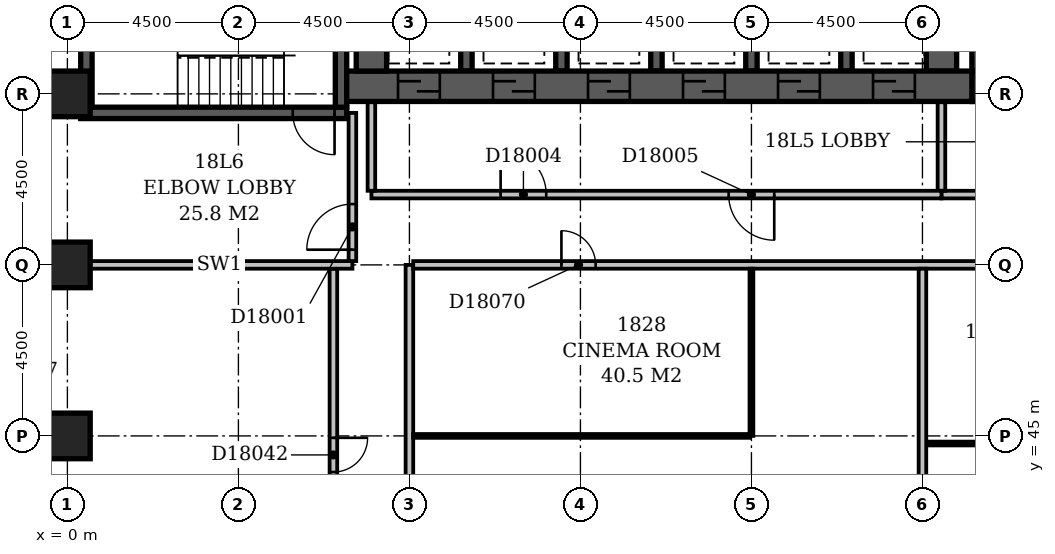
"""IFC4 building model, lengths in metres.
Left out: names, types, materials, properties, quantities, classifications, styles, units other than length and angle.
Written with IfcOpenShell. Run it as: python <this file> out.ifc"""

import sys

from ifc_helpers import new_model, si_unit, direction, frame, frame_2d, origin, origin_2d, place, context, subcontext, project, spatial, rectangle, extrude, element, fill, save


model = new_model("IFC4")
c1 = context("Model", 3, precision=1e-05, world=origin(), true_north=direction((0.0, 1.0)))
c2 = subcontext(c1, "Body", "Model", "MODEL_VIEW")
j1 = project(units=[si_unit("LENGTHUNIT", "METRE"), si_unit("PLANEANGLEUNIT", "RADIAN")], contexts=[c1])
p1 = place(None, origin())
s1 = spatial("IfcSite", under=j1, at=p1, CompositionType="ELEMENT")
p2 = place(p1, origin())
s2 = spatial("IfcBuilding", under=s1, at=p2, CompositionType="ELEMENT")
p3 = place(p2, frame((0.0, 0.0, 75.8)))
s3 = spatial("IfcBuildingStorey", under=s2, at=p3, CompositionType="ELEMENT", Elevation=75.8)
p4 = place(p3, frame((0.35, 53.5, -0.3), z_axis=(0.0, 0.0, 1.0), x_axis=(1.0, 0.0, 0.0)))
e1 = element("IfcWall", 1, at=p4, inside=s3, PredefinedType="SHEAR", context=c2, shape_type="SweptSolid", body=[
    extrude(rectangle(XDim=7.0, YDim=0.3, at=frame_2d((3.5, 0.0))), origin(), (0.0, 0.0, 1.0), 3.6),
])
p5 = place(p4, frame((5.58, 0.0, 0.3)))
e2 = element("IfcOpeningElement", 2, at=p5, cuts=e1, PredefinedType="OPENING", context=c2, shape_type="SweptSolid", body=[
    extrude(rectangle(XDim=1.1, YDim=2.1, at=frame_2d((0.55, 1.05))), frame((0.0, 0.162, 0.0), z_axis=(0.0, -1.0, 0.0), x_axis=(1.0, 0.0, 0.0)), (0.0, 0.0, 1.0), 0.324),
])
for number, where, z_axis, x_axis in (
    (3, (0.5, 53.65, -0.3), (0.0, 0.0, 1.0), (0.0, 1.0, 0.0)),
    (4, (7.2, 53.65, -0.3), (0.0, 0.0, 1.0), (0.0, 1.0, 0.0)),
):
    element("IfcWall", number, at=place(p3, frame(where, z_axis=z_axis, x_axis=x_axis)), inside=s3, PredefinedType="SHEAR", context=c2, shape_type="SweptSolid", body=[
        extrude(rectangle(XDim=4.2, YDim=0.3, at=frame_2d((2.1, 0.0))), origin(), (0.0, 0.0, 1.0), 3.6),
    ])
p6 = place(p3, frame((7.35, 54.2, -0.3), z_axis=(0.0, 0.0, 1.0), x_axis=(1.0, 0.0, 0.0)))
e5 = element("IfcWall", 5, at=p6, inside=s3, PredefinedType="SHEAR", context=c2, shape_type="SweptSolid", body=[
    extrude(rectangle(XDim=16.45, YDim=0.8, at=frame_2d((8.225, 0.0))), origin(), (0.0, 0.0, 1.0), 3.6),
])
p7 = place(p6, frame((1.35, 0.0, 0.3)))
e6 = element("IfcOpeningElement", 6, at=p7, cuts=e5, PredefinedType="OPENING", context=c2, shape_type="SweptSolid", body=[
    extrude(rectangle(XDim=1.1, YDim=2.1, at=frame_2d((0.55, 1.05))), frame((0.0, 0.412, 0.0), z_axis=(0.0, -1.0, 0.0), x_axis=(1.0, 0.0, 0.0)), (0.0, 0.0, 1.0), 0.824),
])
p8 = place(p6, frame((3.85, 0.0, 0.3)))
e7 = element("IfcOpeningElement", 7, at=p8, cuts=e5, PredefinedType="OPENING", context=c2, shape_type="SweptSolid", body=[
    extrude(rectangle(XDim=1.1, YDim=2.1, at=frame_2d((0.55, 1.05))), frame((0.0, 0.412, 0.0), z_axis=(0.0, -1.0, 0.0), x_axis=(1.0, 0.0, 0.0)), (0.0, 0.0, 1.0), 0.824),
])
p9 = place(p6, frame((6.35, 0.0, 0.3)))
e8 = element("IfcOpeningElement", 8, at=p9, cuts=e5, PredefinedType="OPENING", context=c2, shape_type="SweptSolid", body=[
    extrude(rectangle(XDim=1.1, YDim=2.1, at=frame_2d((0.55, 1.05))), frame((0.0, 0.412, 0.0), z_axis=(0.0, -1.0, 0.0), x_axis=(1.0, 0.0, 0.0)), (0.0, 0.0, 1.0), 0.824),
])
p10 = place(p6, frame((8.85, 0.0, 0.3)))
e9 = element("IfcOpeningElement", 9, at=p10, cuts=e5, PredefinedType="OPENING", context=c2, shape_type="SweptSolid", body=[
    extrude(rectangle(XDim=1.1, YDim=2.1, at=frame_2d((0.55, 1.05))), frame((0.0, 0.412, 0.0), z_axis=(0.0, -1.0, 0.0), x_axis=(1.0, 0.0, 0.0)), (0.0, 0.0, 1.0), 0.824),
])
p11 = place(p6, frame((11.35, 0.0, 0.3)))
e10 = element("IfcOpeningElement", 10, at=p11, cuts=e5, PredefinedType="OPENING", context=c2, shape_type="SweptSolid", body=[
    extrude(rectangle(XDim=1.1, YDim=2.1, at=frame_2d((0.55, 1.05))), frame((0.0, 0.412, 0.0), z_axis=(0.0, -1.0, 0.0), x_axis=(1.0, 0.0, 0.0)), (0.0, 0.0, 1.0), 0.824),
])
p12 = place(p6, frame((13.85, 0.0, 0.3)))
e11 = element("IfcOpeningElement", 11, at=p12, cuts=e5, PredefinedType="OPENING", context=c2, shape_type="SweptSolid", body=[
    extrude(rectangle(XDim=1.1, YDim=2.1, at=frame_2d((0.55, 1.05))), frame((0.0, 0.412, 0.0), z_axis=(0.0, -1.0, 0.0), x_axis=(1.0, 0.0, 0.0)), (0.0, 0.0, 1.0), 0.824),
])
p13 = place(p3, frame((8.0, 54.6, -0.3), z_axis=(0.0, 0.0, 1.0), x_axis=(0.0, 1.0, 0.0)))
e12 = element("IfcWall", 12, at=p13, inside=s3, PredefinedType="SHEAR", context=c2, shape_type="SweptSolid", body=[
    extrude(rectangle(XDim=3.0, YDim=0.8, at=frame_2d((1.5, 0.0))), origin(), (0.0, 0.0, 1.0), 3.6),
])
for number, where, z_axis, x_axis in (
    (13, (10.5, 54.6, -0.3), (0.0, 0.0, 1.0), (0.0, 1.0, 0.0)),
    (14, (13.0, 54.6, -0.3), (0.0, 0.0, 1.0), (0.0, 1.0, 0.0)),
    (15, (15.5, 54.6, -0.3), (0.0, 0.0, 1.0), (0.0, 1.0, 0.0)),
    (16, (18.0, 54.6, -0.3), (0.0, 0.0, 1.0), (0.0, 1.0, 0.0)),
    (17, (20.5, 54.6, -0.3), (0.0, 0.0, 1.0), (0.0, 1.0, 0.0)),
):
    element("IfcWall", number, at=place(p3, frame(where, z_axis=z_axis, x_axis=x_axis)), inside=s3, PredefinedType="SHEAR", context=c2, shape_type="SweptSolid", body=[
        extrude(rectangle(XDim=3.0, YDim=0.3, at=frame_2d((1.5, 0.0))), origin(), (0.0, 0.0, 1.0), 3.6),
    ])
p14 = place(p3, frame((23.0, 54.6, -0.3), z_axis=(0.0, 0.0, 1.0), x_axis=(0.0, 1.0, 0.0)))
e18 = element("IfcWall", 18, at=p14, inside=s3, PredefinedType="SHEAR", context=c2, shape_type="SweptSolid", body=[
    extrude(rectangle(XDim=3.0, YDim=0.8, at=frame_2d((1.5, 0.0))), origin(), (0.0, 0.0, 1.0), 3.6),
])
p15 = place(p3, frame((23.8, 54.2, -0.3), z_axis=(0.0, 0.0, 1.0), x_axis=(1.0, 0.0, 0.0)))
e19 = element("IfcWall", 19, at=p15, inside=s3, PredefinedType="SHEAR", context=c2, shape_type="SweptSolid", body=[
    extrude(rectangle(XDim=3.3, YDim=0.8, at=frame_2d((1.65, 0.0))), origin(), (0.0, 0.0, 1.0), 3.6),
])
p16 = place(p15, frame((1.1, 0.0, 0.3)))
e20 = element("IfcOpeningElement", 20, at=p16, cuts=e19, PredefinedType="OPENING", context=c2, shape_type="SweptSolid", body=[
    extrude(rectangle(XDim=1.1, YDim=2.1, at=frame_2d((0.55, 1.05))), frame((0.0, 0.412, 0.0), z_axis=(0.0, -1.0, 0.0), x_axis=(1.0, 0.0, 0.0)), (0.0, 0.0, 1.0), 0.824),
])
p17 = place(p3, frame((24.2, 54.6, -0.3), z_axis=(0.0, 0.0, 1.0), x_axis=(0.0, 1.0, 0.0)))
e21 = element("IfcWall", 21, at=p17, inside=s3, PredefinedType="SHEAR", context=c2, shape_type="SweptSolid", body=[
    extrude(rectangle(XDim=3.0, YDim=0.8, at=frame_2d((1.5, 0.0))), origin(), (0.0, 0.0, 1.0), 3.6),
])
for number, where, z_axis, x_axis in (
    (22, (0.0, 45.0, -0.3), (0.0, 0.0, 1.0), (1.0, 0.0, 0.0)),
    (23, (0.0, 49.5, -0.3), (0.0, 0.0, 1.0), (1.0, 0.0, 0.0)),
    (24, (0.0, 54.0, -0.3), (0.0, 0.0, 1.0), (1.0, 0.0, 0.0)),
):
    element("IfcColumn", number, at=place(p3, frame(where, z_axis=z_axis, x_axis=x_axis)), inside=s3, PredefinedType="COLUMN", context=c2, shape_type="SweptSolid", body=[
        extrude(rectangle(XDim=1.2, YDim=1.2, at=origin_2d()), origin(), (0.0, 0.0, 1.0), 3.6),
    ])
p18 = place(p3, frame((8.0, 51.35, 0.0), z_axis=(0.0, 0.0, 1.0), x_axis=(1.0, 0.0, 0.0)))
e25 = element("IfcWall", 25, at=p18, inside=s3, PredefinedType="PARTITIONING", context=c2, shape_type="SweptSolid", body=[
    extrude(rectangle(XDim=15.0, YDim=0.2, at=frame_2d((7.5, 0.0))), origin(), (0.0, 0.0, 1.0), 3.3),
])
p19 = place(p18, frame((3.4, 0.0, 0.0)))
e26 = element("IfcOpeningElement", 26, at=p19, cuts=e25, PredefinedType="OPENING", context=c2, shape_type="SweptSolid", body=[
    extrude(rectangle(XDim=1.2, YDim=2.1, at=frame_2d((0.6, 1.05))), frame((0.0, 0.112, 0.0), z_axis=(0.0, -1.0, 0.0), x_axis=(1.0, 0.0, 0.0)), (0.0, 0.0, 1.0), 0.224),
])
p20 = place(p18, frame((9.4, 0.0, 0.0)))
e27 = element("IfcOpeningElement", 27, at=p20, cuts=e25, PredefinedType="OPENING", context=c2, shape_type="SweptSolid", body=[
    extrude(rectangle(XDim=1.2, YDim=2.1, at=frame_2d((0.6, 1.05))), frame((0.0, 0.112, 0.0), z_axis=(0.0, -1.0, 0.0), x_axis=(1.0, 0.0, 0.0)), (0.0, 0.0, 1.0), 0.224),
])
for number, where, z_axis, x_axis in (
    (28, (23.0, 51.45, 0.0), (0.0, 0.0, 1.0), (0.0, 1.0, 0.0)),
    (29, (8.0, 51.45, 0.0), (0.0, 0.0, 1.0), (0.0, 1.0, 0.0)),
):
    element("IfcWall", number, at=place(p3, frame(where, z_axis=z_axis, x_axis=x_axis)), inside=s3, PredefinedType="PARTITIONING", context=c2, shape_type="SweptSolid", body=[
        extrude(rectangle(XDim=2.33, YDim=0.2, at=frame_2d((1.165, 0.0))), origin(), (0.0, 0.0, 1.0), 3.3),
    ])
p21 = place(p3, frame((23.0, 51.35, 0.0), z_axis=(0.0, 0.0, 1.0), x_axis=(1.0, 0.0, 0.0)))
e30 = element("IfcWall", 30, at=p21, inside=s3, PredefinedType="PARTITIONING", context=c2, shape_type="SweptSolid", body=[
    extrude(rectangle(XDim=4.8, YDim=0.2, at=frame_2d((2.4, 0.0))), origin(), (0.0, 0.0, 1.0), 3.3),
])
p22 = place(p21, frame((1.65, 0.0, 0.0)))
e31 = element("IfcOpeningElement", 31, at=p22, cuts=e30, PredefinedType="OPENING", context=c2, shape_type="SweptSolid", body=[
    extrude(rectangle(XDim=1.2, YDim=2.1, at=frame_2d((0.6, 1.05))), frame((0.0, 0.112, 0.0), z_axis=(0.0, -1.0, 0.0), x_axis=(1.0, 0.0, 0.0)), (0.0, 0.0, 1.0), 0.224),
])
p23 = place(p3, frame((0.5, 49.5, 0.0), z_axis=(0.0, 0.0, 1.0), x_axis=(1.0, 0.0, 0.0)))
e32 = element("IfcWall", 32, at=p23, inside=s3, PredefinedType="PARTITIONING", context=c2, shape_type="SweptSolid", body=[
    extrude(rectangle(XDim=7.0, YDim=0.2, at=frame_2d((3.5, 0.0))), origin(), (0.0, 0.0, 1.0), 3.3),
])
p24 = place(p3, frame((7.5, 49.6, 0.0), z_axis=(0.0, 0.0, 1.0), x_axis=(0.0, 1.0, 0.0)))
e33 = element("IfcWall", 33, at=p24, inside=s3, PredefinedType="PARTITIONING", context=c2, shape_type="SweptSolid", body=[
    extrude(rectangle(XDim=3.9, YDim=0.2, at=frame_2d((1.95, 0.0))), origin(), (0.0, 0.0, 1.0), 3.3),
])
p25 = place(p24, frame((0.3, 0.0, 0.0)))
e34 = element("IfcOpeningElement", 34, at=p25, cuts=e33, PredefinedType="OPENING", context=c2, shape_type="SweptSolid", body=[
    extrude(rectangle(XDim=1.2, YDim=2.1, at=frame_2d((0.6, 1.05))), frame((0.0, 0.112, 0.0), z_axis=(0.0, -1.0, 0.0), x_axis=(1.0, 0.0, 0.0)), (0.0, 0.0, 1.0), 0.224),
])
p26 = place(p3, frame((9.0, 5.0, 0.0), z_axis=(0.0, 0.0, 1.0), x_axis=(0.0, 1.0, 0.0)))
e35 = element("IfcWall", 35, at=p26, inside=s3, PredefinedType="PARTITIONING", context=c2, shape_type="SweptSolid", body=[
    extrude(rectangle(XDim=44.5, YDim=0.2, at=frame_2d((22.25, 0.0))), origin(), (0.0, 0.0, 1.0), 3.3),
])
p27 = place(p26, frame((17.8, 0.0, 0.0)))
e36 = element("IfcOpeningElement", 36, at=p27, cuts=e35, PredefinedType="OPENING", context=c2, shape_type="SweptSolid", body=[
    extrude(rectangle(XDim=1.0, YDim=2.1, at=frame_2d((0.5, 1.05))), frame((0.0, 0.112, 0.0), z_axis=(0.0, -1.0, 0.0), x_axis=(1.0, 0.0, 0.0)), (0.0, 0.0, 1.0), 0.224),
])
p28 = place(p26, frame((14.95, 0.0, 0.0)))
e37 = element("IfcOpeningElement", 37, at=p28, cuts=e35, PredefinedType="OPENING", context=c2, shape_type="SweptSolid", body=[
    extrude(rectangle(XDim=1.0, YDim=2.1, at=frame_2d((0.5, 1.05))), frame((0.0, 0.112, 0.0), z_axis=(0.0, -1.0, 0.0), x_axis=(1.0, 0.0, 0.0)), (0.0, 0.0, 1.0), 0.224),
])
p29 = place(p26, frame((10.45, 0.0, 0.0)))
e38 = element("IfcOpeningElement", 38, at=p29, cuts=e35, PredefinedType="OPENING", context=c2, shape_type="SweptSolid", body=[
    extrude(rectangle(XDim=1.0, YDim=2.1, at=frame_2d((0.5, 1.05))), frame((0.0, 0.112, 0.0), z_axis=(0.0, -1.0, 0.0), x_axis=(1.0, 0.0, 0.0)), (0.0, 0.0, 1.0), 0.224),
])
p30 = place(p26, frame((5.95, 0.0, 0.0)))
e39 = element("IfcOpeningElement", 39, at=p30, cuts=e35, PredefinedType="OPENING", context=c2, shape_type="SweptSolid", body=[
    extrude(rectangle(XDim=1.0, YDim=2.1, at=frame_2d((0.5, 1.05))), frame((0.0, 0.112, 0.0), z_axis=(0.0, -1.0, 0.0), x_axis=(1.0, 0.0, 0.0)), (0.0, 0.0, 1.0), 0.224),
])
p31 = place(p26, frame((35.0, 0.0, 0.0)))
e40 = element("IfcOpeningElement", 40, at=p31, cuts=e35, PredefinedType="OPENING", context=c2, shape_type="SweptSolid", body=[
    extrude(rectangle(XDim=0.9, YDim=2.1, at=frame_2d((0.45, 1.05))), frame((0.0, 0.112, 0.0), z_axis=(0.0, -1.0, 0.0), x_axis=(1.0, 0.0, 0.0)), (0.0, 0.0, 1.0), 0.224),
])
p32 = place(p26, frame((1.5, 0.0, 0.0)))
e41 = element("IfcOpeningElement", 41, at=p32, cuts=e35, PredefinedType="OPENING", context=c2, shape_type="SweptSolid", body=[
    extrude(rectangle(XDim=0.9, YDim=2.1, at=frame_2d((0.45, 1.05))), frame((0.0, 0.112, 0.0), z_axis=(0.0, -1.0, 0.0), x_axis=(1.0, 0.0, 0.0)), (0.0, 0.0, 1.0), 0.224),
])
p33 = place(p3, frame((7.0, 34.6, 0.0), z_axis=(0.0, 0.0, 1.0), x_axis=(0.0, 1.0, 0.0)))
e42 = element("IfcWall", 42, at=p33, inside=s3, PredefinedType="PARTITIONING", context=c2, shape_type="SweptSolid", body=[
    extrude(rectangle(XDim=14.8, YDim=0.2, at=frame_2d((7.4, 0.0))), origin(), (0.0, 0.0, 1.0), 3.3),
])
p34 = place(p33, frame((1.9, 0.0, 0.0)))
e43 = element("IfcOpeningElement", 43, at=p34, cuts=e42, PredefinedType="OPENING", context=c2, shape_type="SweptSolid", body=[
    extrude(rectangle(XDim=1.0, YDim=2.1, at=frame_2d((0.5, 1.05))), frame((0.0, 0.112, 0.0), z_axis=(0.0, -1.0, 0.0), x_axis=(1.0, 0.0, 0.0)), (0.0, 0.0, 1.0), 0.224),
])
p35 = place(p33, frame((9.45, 0.0, 0.0)))
e44 = element("IfcOpeningElement", 44, at=p35, cuts=e42, PredefinedType="OPENING", context=c2, shape_type="SweptSolid", body=[
    extrude(rectangle(XDim=0.9, YDim=2.1, at=frame_2d((0.45, 1.05))), frame((0.0, 0.112, 0.0), z_axis=(0.0, -1.0, 0.0), x_axis=(1.0, 0.0, 0.0)), (0.0, 0.0, 1.0), 0.224),
])
p36 = place(p3, frame((22.5, 36.6, 0.0), z_axis=(0.0, 0.0, 1.0), x_axis=(0.0, 1.0, 0.0)))
e45 = element("IfcWall", 45, at=p36, inside=s3, PredefinedType="PARTITIONING", context=c2, shape_type="SweptSolid", body=[
    extrude(rectangle(XDim=12.8, YDim=0.2, at=frame_2d((6.4, 0.0))), origin(), (0.0, 0.0, 1.0), 3.3),
])
p37 = place(p3, frame((22.6, 44.8, 0.0), z_axis=(0.0, 0.0, 1.0), x_axis=(1.0, 0.0, 0.0)))
e46 = element("IfcWall", 46, at=p37, inside=s3, PredefinedType="PARTITIONING", context=c2, shape_type="SweptSolid", body=[
    extrude(rectangle(XDim=4.85, YDim=0.1, at=frame_2d((2.425, 0.0))), origin(), (0.0, 0.0, 1.0), 3.3),
])
p38 = place(p37, frame((1.95, 0.0, 0.0)))
e47 = element("IfcOpeningElement", 47, at=p38, cuts=e46, PredefinedType="OPENING", context=c2, shape_type="SweptSolid", body=[
    extrude(rectangle(XDim=0.9, YDim=2.1, at=frame_2d((0.45, 1.05))), frame((0.0, 0.062, 0.0), z_axis=(0.0, -1.0, 0.0), x_axis=(1.0, 0.0, 0.0)), (0.0, 0.0, 1.0), 0.124),
])
p39 = place(p3, frame((9.1, 45.0, 0.0), z_axis=(0.0, 0.0, 1.0), x_axis=(1.0, 0.0, 0.0)))
e48 = element("IfcWall", 48, at=p39, inside=s3, PredefinedType="PARTITIONING", context=c2, shape_type="SweptSolid", body=[
    extrude(rectangle(XDim=8.85, YDim=0.1, at=frame_2d((4.425, 0.0))), origin(), (0.0, 0.0, 1.0), 3.3),
])
p40 = place(p3, frame((18.0, 45.0, 0.0), z_axis=(0.0, 0.0, 1.0), x_axis=(0.0, 1.0, 0.0)))
e49 = element("IfcWall", 49, at=p40, inside=s3, PredefinedType="PARTITIONING", context=c2, shape_type="SweptSolid", body=[
    extrude(rectangle(XDim=4.4, YDim=0.1, at=frame_2d((2.2, 0.0))), origin(), (0.0, 0.0, 1.0), 3.3),
])
p41 = place(p3, frame((9.1, 49.5, 0.0), z_axis=(0.0, 0.0, 1.0), x_axis=(1.0, 0.0, 0.0)))
e50 = element("IfcWall", 50, at=p41, inside=s3, PredefinedType="PARTITIONING", context=c2, shape_type="SweptSolid", body=[
    extrude(rectangle(XDim=57.8, YDim=0.2, at=frame_2d((28.9, 0.0))), origin(), (0.0, 0.0, 1.0), 3.3),
])
p42 = place(p41, frame((18.7, 0.0, 0.0)))
e51 = element("IfcOpeningElement", 51, at=p42, cuts=e50, PredefinedType="OPENING", context=c2, shape_type="SweptSolid", body=[
    extrude(rectangle(XDim=1.0, YDim=2.1, at=frame_2d((0.5, 1.05))), frame((0.0, 0.112, 0.0), z_axis=(0.0, -1.0, 0.0), x_axis=(1.0, 0.0, 0.0)), (0.0, 0.0, 1.0), 0.224),
])
p43 = place(p41, frame((24.35, 0.0, 0.0)))
e52 = element("IfcOpeningElement", 52, at=p43, cuts=e50, PredefinedType="OPENING", context=c2, shape_type="SweptSolid", body=[
    extrude(rectangle(XDim=1.0, YDim=2.1, at=frame_2d((0.5, 1.05))), frame((0.0, 0.112, 0.0), z_axis=(0.0, -1.0, 0.0), x_axis=(1.0, 0.0, 0.0)), (0.0, 0.0, 1.0), 0.224),
])
p44 = place(p41, frame((27.2, 0.0, 0.0)))
e53 = element("IfcOpeningElement", 53, at=p44, cuts=e50, PredefinedType="OPENING", context=c2, shape_type="SweptSolid", body=[
    extrude(rectangle(XDim=1.0, YDim=2.1, at=frame_2d((0.5, 1.05))), frame((0.0, 0.112, 0.0), z_axis=(0.0, -1.0, 0.0), x_axis=(1.0, 0.0, 0.0)), (0.0, 0.0, 1.0), 0.224),
])
p45 = place(p41, frame((43.1, 0.0, 0.0)))
e54 = element("IfcOpeningElement", 54, at=p45, cuts=e50, PredefinedType="OPENING", context=c2, shape_type="SweptSolid", body=[
    extrude(rectangle(XDim=1.0, YDim=2.1, at=frame_2d((0.5, 1.05))), frame((0.0, 0.112, 0.0), z_axis=(0.0, -1.0, 0.0), x_axis=(1.0, 0.0, 0.0)), (0.0, 0.0, 1.0), 0.224),
])
p46 = place(p41, frame((3.9, 0.0, 0.0)))
e55 = element("IfcOpeningElement", 55, at=p46, cuts=e50, PredefinedType="OPENING", context=c2, shape_type="SweptSolid", body=[
    extrude(rectangle(XDim=0.9, YDim=2.1, at=frame_2d((0.45, 1.05))), frame((0.0, 0.112, 0.0), z_axis=(0.0, -1.0, 0.0), x_axis=(1.0, 0.0, 0.0)), (0.0, 0.0, 1.0), 0.224),
])
p47 = place(p25, origin())
e56 = element("IfcDoor", 56, at=p47, inside=s3, OperationType="SINGLE_SWING_LEFT", PredefinedType="DOOR", context=c2, shape_type="SweptSolid", body=[
    extrude(rectangle(XDim=1.2, YDim=2.1, at=frame_2d((0.6, 1.05))), frame((0.0, 0.025, 0.0), z_axis=(0.0, -1.0, 0.0), x_axis=(1.0, 0.0, 0.0)), (0.0, 0.0, 1.0), 0.05),
])
fill(e34, e56)
p48 = place(p7, origin())
e57 = element("IfcDoor", 57, at=p48, inside=s3, OperationType="SLIDING_TO_LEFT", PredefinedType="DOOR", context=c2, shape_type="SweptSolid", body=[
    extrude(rectangle(XDim=1.1, YDim=2.1, at=frame_2d((0.55, 1.05))), frame((0.0, 0.025, 0.0), z_axis=(0.0, -1.0, 0.0), x_axis=(1.0, 0.0, 0.0)), (0.0, 0.0, 1.0), 0.05),
])
fill(e6, e57)
p49 = place(p8, origin())
e58 = element("IfcDoor", 58, at=p49, inside=s3, OperationType="SLIDING_TO_LEFT", PredefinedType="DOOR", context=c2, shape_type="SweptSolid", body=[
    extrude(rectangle(XDim=1.1, YDim=2.1, at=frame_2d((0.55, 1.05))), frame((0.0, 0.025, 0.0), z_axis=(0.0, -1.0, 0.0), x_axis=(1.0, 0.0, 0.0)), (0.0, 0.0, 1.0), 0.05),
])
fill(e7, e58)
p50 = place(p9, origin())
e59 = element("IfcDoor", 59, at=p50, inside=s3, OperationType="SLIDING_TO_LEFT", PredefinedType="DOOR", context=c2, shape_type="SweptSolid", body=[
    extrude(rectangle(XDim=1.1, YDim=2.1, at=frame_2d((0.55, 1.05))), frame((0.0, 0.025, 0.0), z_axis=(0.0, -1.0, 0.0), x_axis=(1.0, 0.0, 0.0)), (0.0, 0.0, 1.0), 0.05),
])
fill(e8, e59)
p51 = place(p10, origin())
e60 = element("IfcDoor", 60, at=p51, inside=s3, OperationType="SLIDING_TO_LEFT", PredefinedType="DOOR", context=c2, shape_type="SweptSolid", body=[
    extrude(rectangle(XDim=1.1, YDim=2.1, at=frame_2d((0.55, 1.05))), frame((0.0, 0.025, 0.0), z_axis=(0.0, -1.0, 0.0), x_axis=(1.0, 0.0, 0.0)), (0.0, 0.0, 1.0), 0.05),
])
fill(e9, e60)
p52 = place(p11, origin())
e61 = element("IfcDoor", 61, at=p52, inside=s3, OperationType="SLIDING_TO_LEFT", PredefinedType="DOOR", context=c2, shape_type="SweptSolid", body=[
    extrude(rectangle(XDim=1.1, YDim=2.1, at=frame_2d((0.55, 1.05))), frame((0.0, 0.025, 0.0), z_axis=(0.0, -1.0, 0.0), x_axis=(1.0, 0.0, 0.0)), (0.0, 0.0, 1.0), 0.05),
])
fill(e10, e61)
p53 = place(p12, origin())
e62 = element("IfcDoor", 62, at=p53, inside=s3, OperationType="SLIDING_TO_LEFT", PredefinedType="DOOR", context=c2, shape_type="SweptSolid", body=[
    extrude(rectangle(XDim=1.1, YDim=2.1, at=frame_2d((0.55, 1.05))), frame((0.0, 0.025, 0.0), z_axis=(0.0, -1.0, 0.0), x_axis=(1.0, 0.0, 0.0)), (0.0, 0.0, 1.0), 0.05),
])
fill(e11, e62)
p54 = place(p19, origin())
e63 = element("IfcDoor", 63, at=p54, inside=s3, OperationType="SINGLE_SWING_LEFT", PredefinedType="DOOR", context=c2, shape_type="SweptSolid", body=[
    extrude(rectangle(XDim=1.2, YDim=2.1, at=frame_2d((0.6, 1.05))), frame((0.0, 0.025, 0.0), z_axis=(0.0, -1.0, 0.0), x_axis=(1.0, 0.0, 0.0)), (0.0, 0.0, 1.0), 0.05),
])
fill(e26, e63)
p55 = place(p20, origin())
e64 = element("IfcDoor", 64, at=p55, inside=s3, OperationType="SINGLE_SWING_RIGHT", PredefinedType="DOOR", context=c2, shape_type="SweptSolid", body=[
    extrude(rectangle(XDim=1.2, YDim=2.1, at=frame_2d((0.6, 1.05))), frame((0.0, 0.025, 0.0), z_axis=(0.0, -1.0, 0.0), x_axis=(1.0, 0.0, 0.0)), (0.0, 0.0, 1.0), 0.05),
])
fill(e27, e64)
p56 = place(p5, origin())
e65 = element("IfcDoor", 65, at=p56, inside=s3, OperationType="SINGLE_SWING_RIGHT", PredefinedType="DOOR", context=c2, shape_type="SweptSolid", body=[
    extrude(rectangle(XDim=1.1, YDim=2.1, at=frame_2d((0.55, 1.05))), frame((0.0, 0.025, 0.0), z_axis=(0.0, -1.0, 0.0), x_axis=(1.0, 0.0, 0.0)), (0.0, 0.0, 1.0), 0.05),
])
fill(e2, e65)
p57 = place(p35, origin())
e66 = element("IfcDoor", 66, at=p57, inside=s3, OperationType="SINGLE_SWING_RIGHT", PredefinedType="DOOR", context=c2, shape_type="SweptSolid", body=[
    extrude(rectangle(XDim=0.9, YDim=2.1, at=frame_2d((0.45, 1.05))), frame((0.0, 0.025, 0.0), z_axis=(0.0, -1.0, 0.0), x_axis=(1.0, 0.0, 0.0)), (0.0, 0.0, 1.0), 0.05),
])
fill(e44, e66)
p58 = place(p46, origin())
e67 = element("IfcDoor", 67, at=p58, inside=s3, OperationType="SINGLE_SWING_LEFT", PredefinedType="DOOR", context=c2, shape_type="SweptSolid", body=[
    extrude(rectangle(XDim=0.9, YDim=2.1, at=frame_2d((0.45, 1.05))), frame((0.0, 0.025, 0.0), z_axis=(0.0, -1.0, 0.0), x_axis=(1.0, 0.0, 0.0)), (0.0, 0.0, 1.0), 0.05),
])
fill(e55, e67)
save(model, sys.argv[1])
